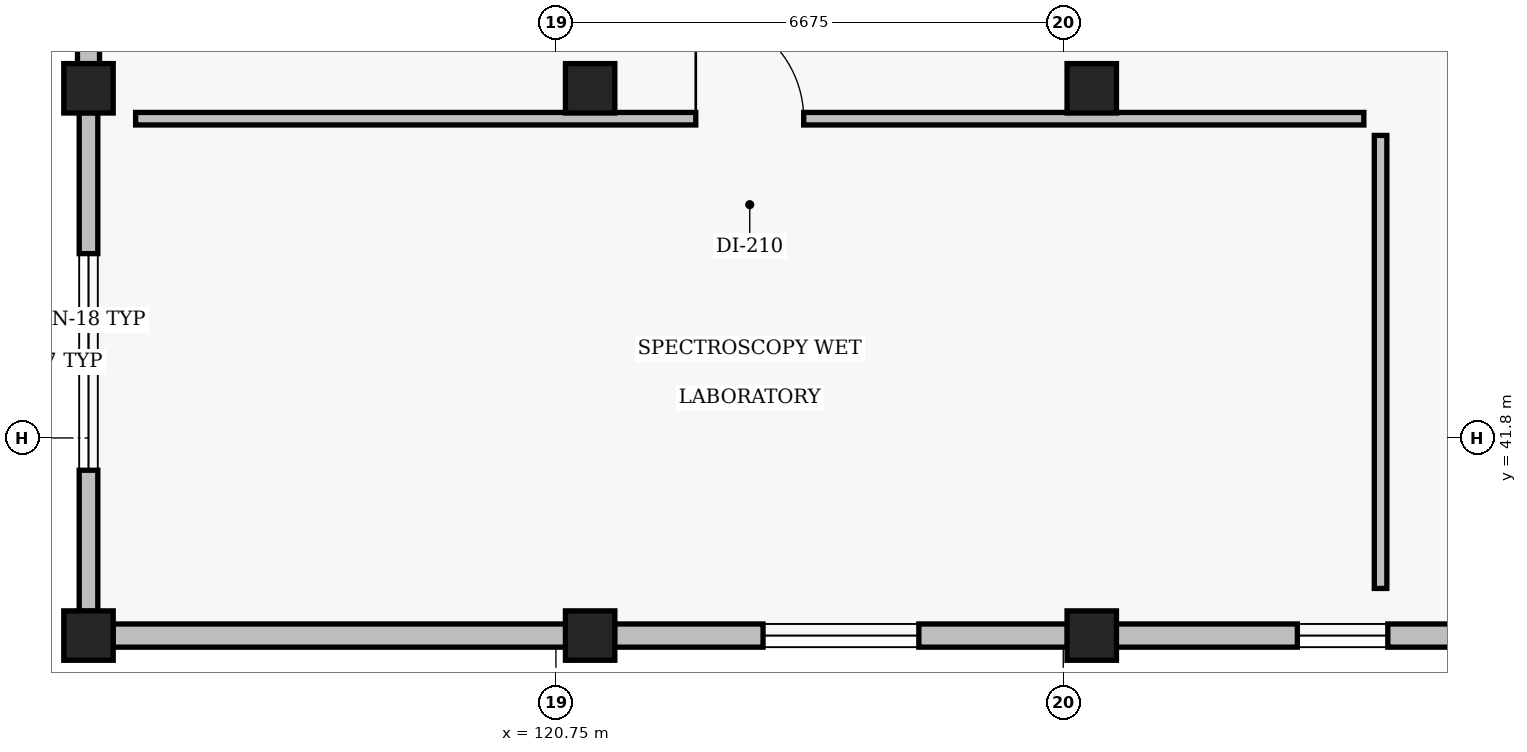
"""IFC4 building model, lengths in metres.
Left out: names, types, materials, properties, quantities, classifications, styles, units other than length and angle.
Written with IfcOpenShell. Run it as: python <this file> out.ifc"""

import sys

from ifc_helpers import new_model, si_unit, direction, frame, frame_2d, origin, origin_2d, place, context, subcontext, project, spatial, rectangle, extrude, element, fill, save


model = new_model("IFC4")
c1 = context("Model", 3, precision=1e-05, world=origin(), true_north=direction((0.0, 1.0)))
c2 = subcontext(c1, "Body", "Model", "MODEL_VIEW")
j1 = project(units=[si_unit("LENGTHUNIT", "METRE"), si_unit("PLANEANGLEUNIT", "RADIAN")], contexts=[c1])
p1 = place(None, origin())
s1 = spatial("IfcSite", under=j1, at=p1, CompositionType="ELEMENT")
p2 = place(p1, origin())
s2 = spatial("IfcBuilding", under=s1, at=p2, CompositionType="ELEMENT")
p3 = place(p2, frame((0.0, 0.0, 9.6)))
s3 = spatial("IfcBuildingStorey", under=s2, at=p3, CompositionType="ELEMENT", Elevation=9.6)
for number, where, z_axis, x_axis in (
    (1, (114.6, 39.2, 0.0), (0.0, 0.0, 1.0), (1.0, 0.0, 0.0)),
    (2, (114.6, 46.4, 0.0), (0.0, 0.0, 1.0), (1.0, 0.0, 0.0)),
    (3, (121.2, 39.2, 0.0), (0.0, 0.0, 1.0), (1.0, 0.0, 0.0)),
    (4, (121.2, 46.4, 0.0), (0.0, 0.0, 1.0), (1.0, 0.0, 0.0)),
    (5, (127.8, 39.2, 0.0), (0.0, 0.0, 1.0), (1.0, 0.0, 0.0)),
    (6, (127.8, 46.4, 0.0), (0.0, 0.0, 1.0), (1.0, 0.0, 0.0)),
):
    element("IfcColumn", number, at=place(p3, frame(where, z_axis=z_axis, x_axis=x_axis)), inside=s3, PredefinedType="COLUMN", context=c2, shape_type="SweptSolid", body=[
        extrude(rectangle(XDim=0.65, YDim=0.65, at=origin_2d()), origin(), (0.0, 0.0, 1.0), 4.3),
    ])
p4 = place(p3, frame((114.6, 39.52, 0.0), z_axis=(0.0, 0.0, 1.0), x_axis=(0.0, 1.0, 0.0)))
e7 = element("IfcWall", 7, at=p4, inside=s3, PredefinedType="STANDARD", context=c2, shape_type="SweptSolid", body=[
    extrude(rectangle(XDim=6.56, YDim=0.245, at=frame_2d((3.28, 0.0))), origin(), (0.0, 0.0, 1.0), 3.835),
])
p5 = place(p4, frame((1.855, 0.0, 0.95)))
e8 = element("IfcOpeningElement", 8, at=p5, cuts=e7, PredefinedType="OPENING", context=c2, shape_type="SweptSolid", body=[
    extrude(rectangle(XDim=2.85, YDim=1.5, at=frame_2d((1.425, 0.75))), frame((0.0, 0.123, 0.0), z_axis=(0.0, -1.0, 0.0), x_axis=(1.0, 0.0, 0.0)), (0.0, 0.0, 1.0), 0.245),
])
p6 = place(p3, frame((114.6, 46.72, 0.0), z_axis=(0.0, 0.0, 1.0), x_axis=(0.0, 1.0, 0.0)))
e9 = element("IfcWall", 9, at=p6, inside=s3, PredefinedType="STANDARD", context=c2, shape_type="SweptSolid", body=[
    extrude(rectangle(XDim=6.56, YDim=0.29, at=frame_2d((3.28, 0.0))), origin(), (0.0, 0.0, 1.0), 3.835),
])
p7 = place(p6, frame((2.64, 0.0, 0.95)))
e10 = element("IfcOpeningElement", 10, at=p7, cuts=e9, PredefinedType="OPENING", context=c2, shape_type="SweptSolid", body=[
    extrude(rectangle(XDim=1.28, YDim=1.42, at=frame_2d((0.64, 0.71))), frame((0.0, 0.145, 0.0), z_axis=(0.0, -1.0, 0.0), x_axis=(1.0, 0.0, 0.0)), (0.0, 0.0, 1.0), 0.29),
])
p8 = place(p3, frame((134.08, 39.2, 0.0), z_axis=(0.0, 0.0, 1.0), x_axis=(-1.0, 0.0, 0.0)))
e11 = element("IfcWall", 11, at=p8, inside=s3, PredefinedType="STANDARD", context=c2, shape_type="SweptSolid", body=[
    extrude(rectangle(XDim=5.96, YDim=0.305, at=frame_2d((2.98, 0.0))), origin(), (0.0, 0.0, 1.0), 3.835),
])
p9 = place(p8, frame((2.385, 0.0, 0.95)))
e12 = element("IfcOpeningElement", 12, at=p9, cuts=e11, PredefinedType="OPENING", context=c2, shape_type="SweptSolid", body=[
    extrude(rectangle(XDim=1.19, YDim=1.38, at=frame_2d((0.595, 0.69))), frame((0.0, 0.152, 0.0), z_axis=(0.0, -1.0, 0.0), x_axis=(1.0, 0.0, 0.0)), (0.0, 0.0, 1.0), 0.305),
])
p10 = place(p3, frame((127.48, 39.2, 0.0), z_axis=(0.0, 0.0, 1.0), x_axis=(-1.0, 0.0, 0.0)))
e13 = element("IfcWall", 13, at=p10, inside=s3, PredefinedType="STANDARD", context=c2, shape_type="SweptSolid", body=[
    extrude(rectangle(XDim=5.96, YDim=0.305, at=frame_2d((2.98, 0.0))), origin(), (0.0, 0.0, 1.0), 3.835),
])
p11 = place(p10, frame((1.955, 0.0, 0.95)))
e14 = element("IfcOpeningElement", 14, at=p11, cuts=e13, PredefinedType="OPENING", context=c2, shape_type="SweptSolid", body=[
    extrude(rectangle(XDim=2.05, YDim=1.7, at=frame_2d((1.025, 0.85))), frame((0.0, 0.152, 0.0), z_axis=(0.0, -1.0, 0.0), x_axis=(1.0, 0.0, 0.0)), (0.0, 0.0, 1.0), 0.305),
])
p12 = place(p3, frame((120.88, 39.2, 0.0), z_axis=(0.0, 0.0, 1.0), x_axis=(-1.0, 0.0, 0.0)))
e15 = element("IfcWall", 15, at=p12, inside=s3, PredefinedType="STANDARD", context=c2, shape_type="SweptSolid", body=[
    extrude(rectangle(XDim=5.96, YDim=0.305, at=frame_2d((2.98, 0.0))), origin(), (0.0, 0.0, 1.0), 3.835),
])
p13 = place(p3, frame((131.6, 39.82, 0.0), z_axis=(0.0, 0.0, 1.0), x_axis=(0.0, 1.0, 0.0)))
e16 = element("IfcWall", 16, at=p13, inside=s3, PredefinedType="PARTITIONING", context=c2, shape_type="SweptSolid", body=[
    extrude(rectangle(XDim=5.96, YDim=0.165, at=frame_2d((2.98, 0.0))), origin(), (0.0, 0.0, 1.0), 3.95),
])
p14 = place(p3, frame((131.38, 46.0, 0.0), z_axis=(0.0, 0.0, 1.0), x_axis=(-1.0, 0.0, 0.0)))
e17 = element("IfcWall", 17, at=p14, inside=s3, PredefinedType="PARTITIONING", context=c2, shape_type="SweptSolid", body=[
    extrude(rectangle(XDim=16.16, YDim=0.165, at=frame_2d((8.08, 0.0))), origin(), (0.0, 0.0, 1.0), 3.95),
])
p15 = place(p14, frame((7.37, 0.0, 0.0)))
e18 = element("IfcOpeningElement", 18, at=p15, cuts=e17, PredefinedType="OPENING", context=c2, shape_type="SweptSolid", body=[
    extrude(rectangle(XDim=1.42, YDim=2.06, at=frame_2d((0.71, 1.03))), frame((0.0, 0.083, 0.0), z_axis=(0.0, -1.0, 0.0), x_axis=(1.0, 0.0, 0.0)), (0.0, 0.0, 1.0), 0.165),
])
p16 = place(p5, origin())
e19 = element("IfcWindow", 19, at=p16, inside=s3, PartitioningType="SINGLE_PANEL", PredefinedType="WINDOW", context=c2, shape_type="SweptSolid", body=[
    extrude(rectangle(XDim=2.85, YDim=1.5, at=frame_2d((1.425, 0.75))), frame((0.0, 0.03, 0.0), z_axis=(0.0, -1.0, 0.0), x_axis=(1.0, 0.0, 0.0)), (0.0, 0.0, 1.0), 0.06),
])
fill(e8, e19)
p17 = place(p9, origin())
e20 = element("IfcWindow", 20, at=p17, inside=s3, PartitioningType="SINGLE_PANEL", PredefinedType="WINDOW", context=c2, shape_type="SweptSolid", body=[
    extrude(rectangle(XDim=1.19, YDim=1.38, at=frame_2d((0.595, 0.69))), frame((0.0, 0.03, 0.0), z_axis=(0.0, -1.0, 0.0), x_axis=(1.0, 0.0, 0.0)), (0.0, 0.0, 1.0), 0.06),
])
fill(e12, e20)
p18 = place(p11, origin())
e21 = element("IfcWindow", 21, at=p18, inside=s3, PartitioningType="SINGLE_PANEL", PredefinedType="WINDOW", context=c2, shape_type="SweptSolid", body=[
    extrude(rectangle(XDim=2.05, YDim=1.7, at=frame_2d((1.025, 0.85))), frame((0.0, 0.03, 0.0), z_axis=(0.0, -1.0, 0.0), x_axis=(1.0, 0.0, 0.0)), (0.0, 0.0, 1.0), 0.06),
])
fill(e14, e21)
p19 = place(p15, origin())
e22 = element("IfcDoor", 22, at=p19, inside=s3, OperationType="SINGLE_SWING_RIGHT", PredefinedType="DOOR", context=c2, shape_type="SweptSolid", body=[
    extrude(rectangle(XDim=1.42, YDim=2.06, at=frame_2d((0.71, 1.03))), frame((0.0, 0.025, 0.0), z_axis=(0.0, -1.0, 0.0), x_axis=(1.0, 0.0, 0.0)), (0.0, 0.0, 1.0), 0.05),
])
fill(e18, e22)
save(model, sys.argv[1])
